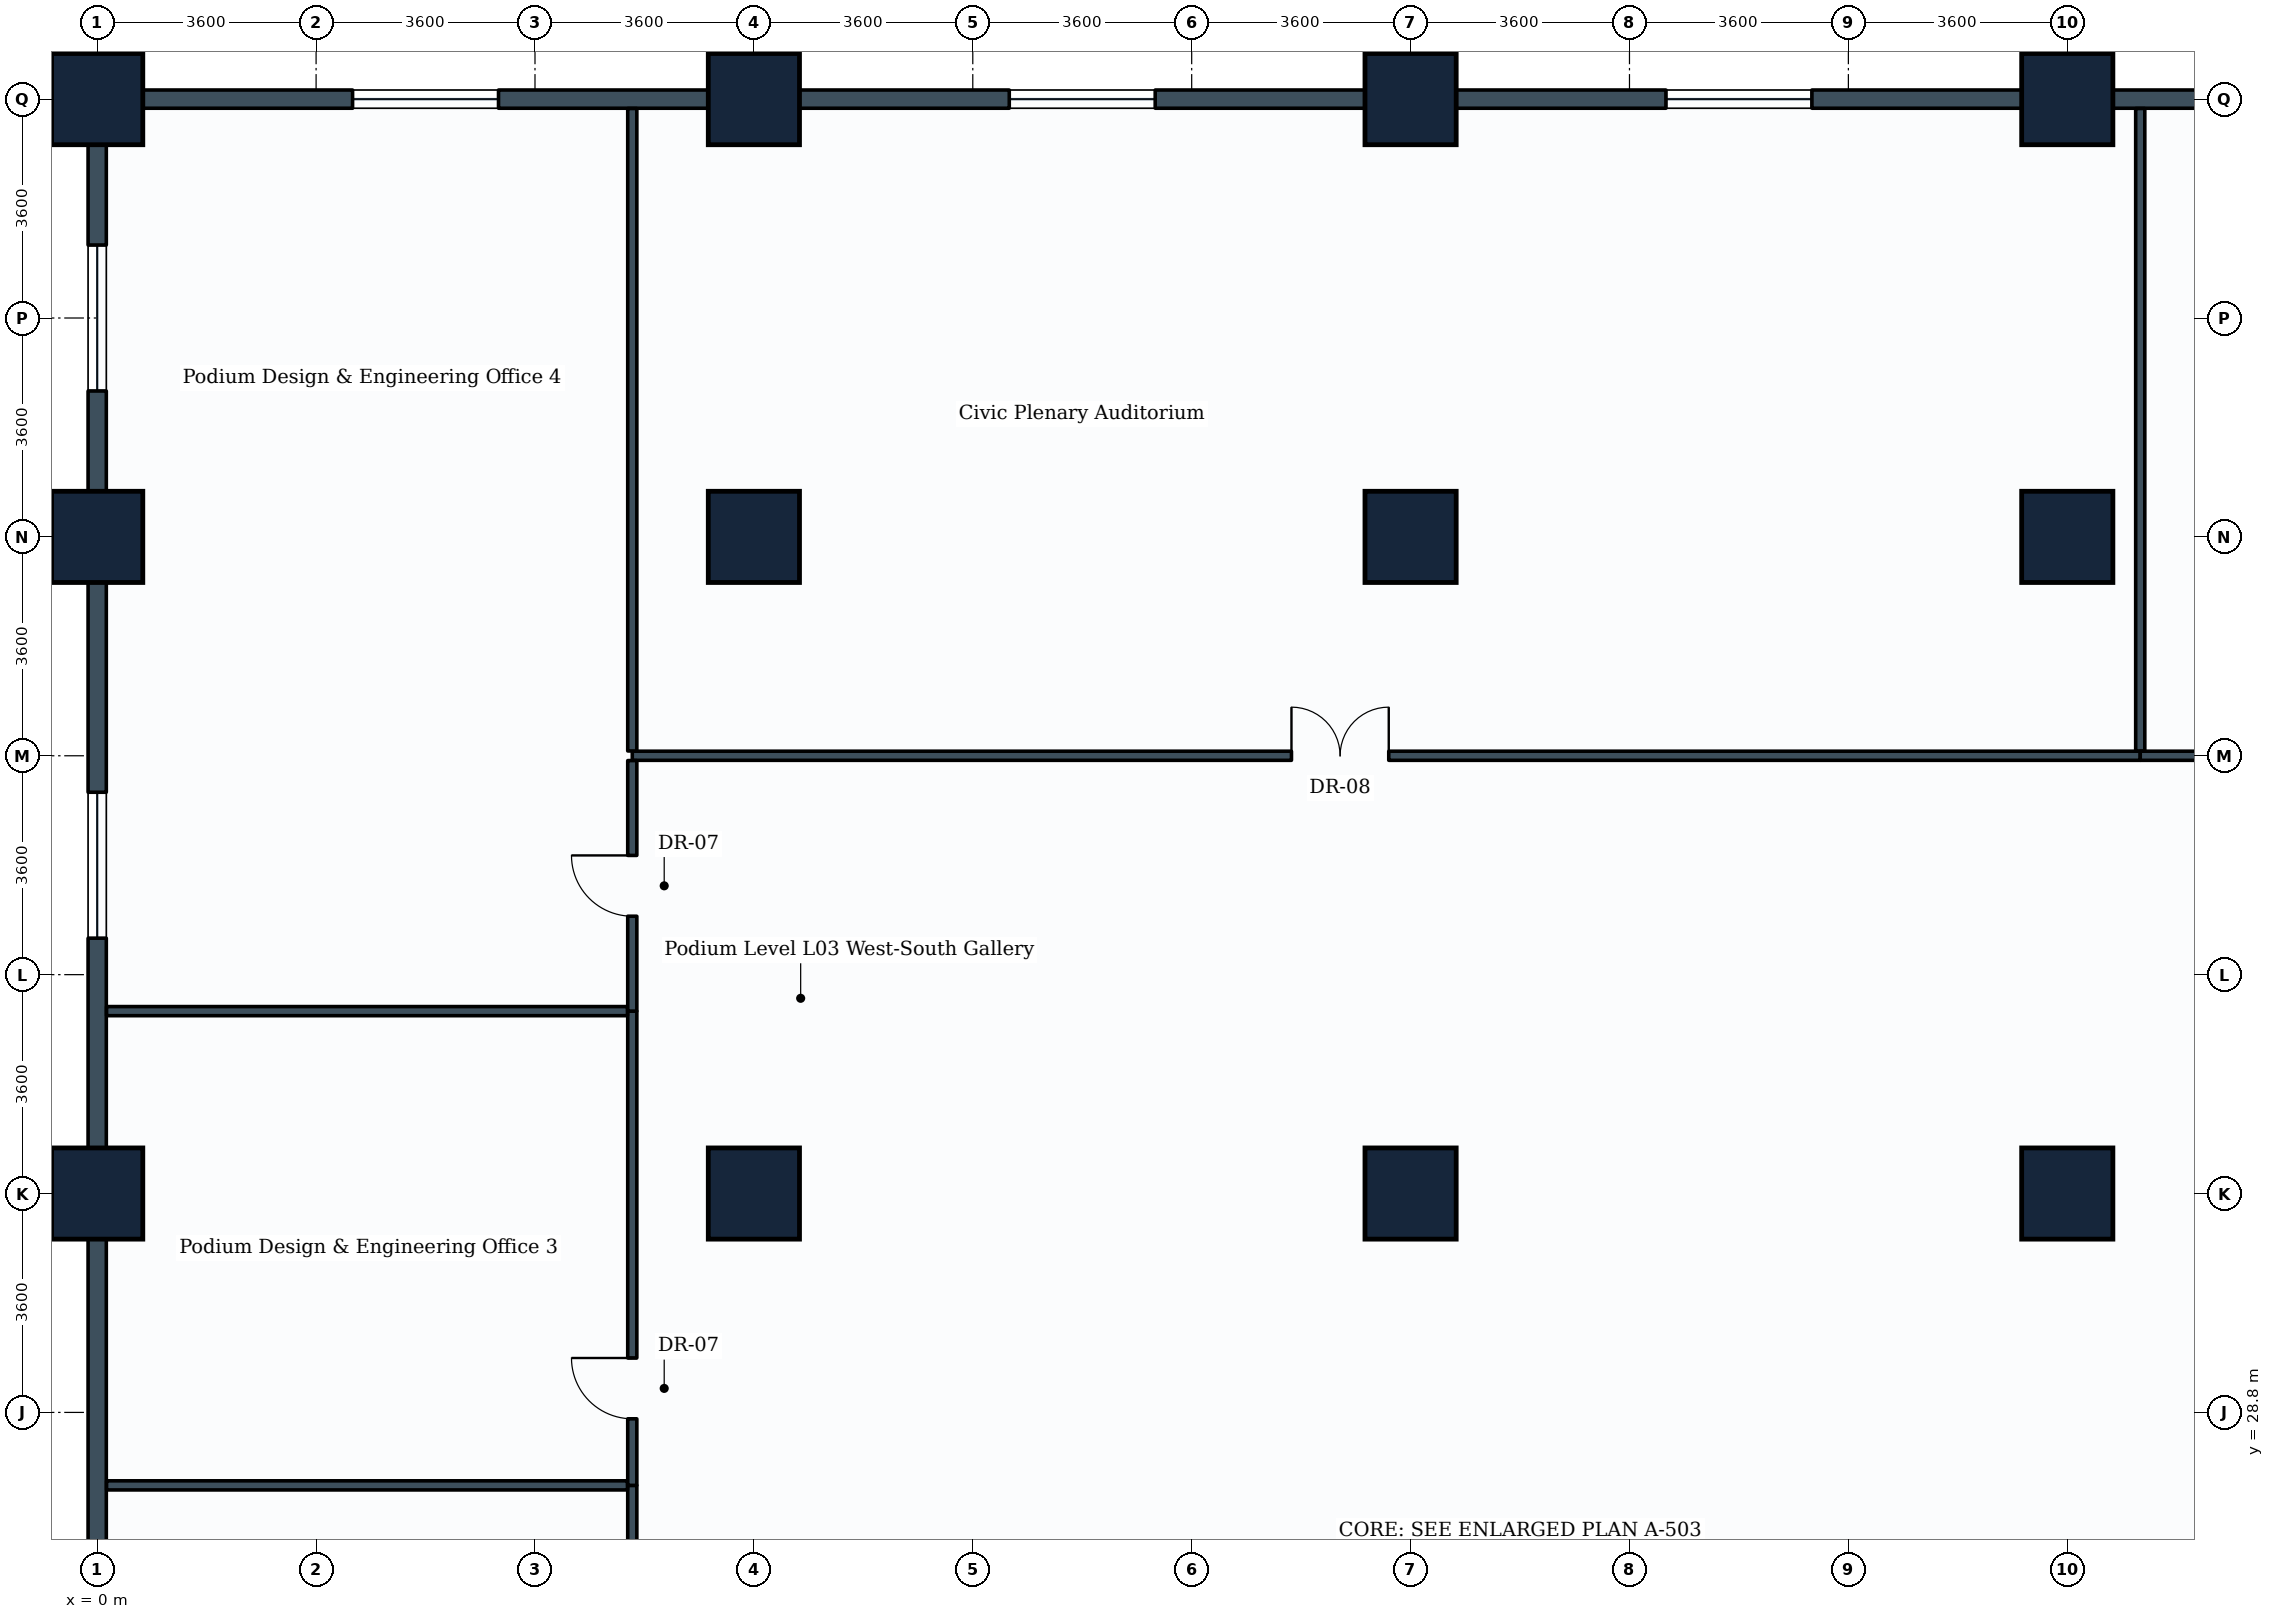
"""IFC4 building model, lengths in metres.
Left out: names, types, materials, properties, quantities, classifications, styles, units other than length and angle.
Written with IfcOpenShell. Run it as: python <this file> out.ifc"""

import sys

from ifc_helpers import new_model, si_unit, direction, frame, frame_2d, origin, origin_2d, place, context, subcontext, project, spatial, rectangle, extrude, element, fill, save


model = new_model("IFC4")
c1 = context("Model", 3, precision=1e-05, world=origin(), true_north=direction((0.0, 1.0)))
c2 = subcontext(c1, "Body", "Model", "MODEL_VIEW")
j1 = project(units=[si_unit("LENGTHUNIT", "METRE"), si_unit("PLANEANGLEUNIT", "RADIAN")], contexts=[c1])
p1 = place(None, origin())
s1 = spatial("IfcSite", under=j1, at=p1, CompositionType="ELEMENT")
p2 = place(p1, origin())
s2 = spatial("IfcBuilding", under=s1, at=p2, CompositionType="ELEMENT")
p3 = place(p2, frame((0.0, 0.0, 14.8)))
s3 = spatial("IfcBuildingStorey", under=s2, at=p3, CompositionType="ELEMENT", Elevation=14.8)
for number, where, z_axis, x_axis in (
    (1, (0.0, 32.4, 0.0), (0.0, 0.0, 1.0), (1.0, 0.0, 0.0)),
    (2, (0.0, 43.2, 0.0), (0.0, 0.0, 1.0), (1.0, 0.0, 0.0)),
    (3, (0.0, 50.4, 0.0), (0.0, 0.0, 1.0), (1.0, 0.0, 0.0)),
    (4, (10.8, 32.4, 0.0), (0.0, 0.0, 1.0), (1.0, 0.0, 0.0)),
    (5, (10.8, 43.2, 0.0), (0.0, 0.0, 1.0), (1.0, 0.0, 0.0)),
    (6, (10.8, 50.4, 0.0), (0.0, 0.0, 1.0), (1.0, 0.0, 0.0)),
    (7, (21.6, 32.4, 0.0), (0.0, 0.0, 1.0), (1.0, 0.0, 0.0)),
    (8, (21.6, 43.2, 0.0), (0.0, 0.0, 1.0), (1.0, 0.0, 0.0)),
    (9, (21.6, 50.4, 0.0), (0.0, 0.0, 1.0), (1.0, 0.0, 0.0)),
    (10, (32.4, 32.4, 0.0), (0.0, 0.0, 1.0), (1.0, 0.0, 0.0)),
    (11, (32.4, 43.2, 0.0), (0.0, 0.0, 1.0), (1.0, 0.0, 0.0)),
    (12, (32.4, 50.4, 0.0), (0.0, 0.0, 1.0), (1.0, 0.0, 0.0)),
):
    element("IfcColumn", number, at=place(p3, frame(where, z_axis=z_axis, x_axis=x_axis)), inside=s3, PredefinedType="COLUMN", context=c2, shape_type="SweptSolid", body=[
        extrude(rectangle(XDim=1.5, YDim=1.5, at=origin_2d()), origin(), (0.0, 0.0, 1.0), 4.6),
    ])
p4 = place(p3, frame((0.0, 50.4, 0.0), z_axis=(0.0, 0.0, 1.0), x_axis=(1.0, 0.0, 0.0)))
e13 = element("IfcWall", 13, at=p4, inside=s3, PredefinedType="STANDARD", context=c2, shape_type="SweptSolid", body=[
    extrude(rectangle(XDim=10.8, YDim=0.3, at=frame_2d((5.4, 0.0))), origin(), (0.0, 0.0, 1.0), 3.63),
])
p5 = place(p4, frame((4.2, 0.0, 0.85)))
e14 = element("IfcOpeningElement", 14, at=p5, cuts=e13, PredefinedType="OPENING", context=c2, shape_type="SweptSolid", body=[
    extrude(rectangle(XDim=2.4, YDim=1.6, at=frame_2d((1.2, 0.8))), frame((0.0, 0.16, 0.0), z_axis=(0.0, -1.0, 0.0), x_axis=(1.0, 0.0, 0.0)), (0.0, 0.0, 1.0), 0.32),
])
p6 = place(p3, frame((10.8, 50.4, 0.0), z_axis=(0.0, 0.0, 1.0), x_axis=(1.0, 0.0, 0.0)))
e15 = element("IfcWall", 15, at=p6, inside=s3, PredefinedType="STANDARD", context=c2, shape_type="SweptSolid", body=[
    extrude(rectangle(XDim=10.8, YDim=0.3, at=frame_2d((5.4, 0.0))), origin(), (0.0, 0.0, 1.0), 3.63),
])
p7 = place(p6, frame((4.2, 0.0, 0.85)))
e16 = element("IfcOpeningElement", 16, at=p7, cuts=e15, PredefinedType="OPENING", context=c2, shape_type="SweptSolid", body=[
    extrude(rectangle(XDim=2.4, YDim=1.6, at=frame_2d((1.2, 0.8))), frame((0.0, 0.16, 0.0), z_axis=(0.0, -1.0, 0.0), x_axis=(1.0, 0.0, 0.0)), (0.0, 0.0, 1.0), 0.32),
])
p8 = place(p3, frame((21.6, 50.4, 0.0), z_axis=(0.0, 0.0, 1.0), x_axis=(1.0, 0.0, 0.0)))
e17 = element("IfcWall", 17, at=p8, inside=s3, PredefinedType="STANDARD", context=c2, shape_type="SweptSolid", body=[
    extrude(rectangle(XDim=10.8, YDim=0.3, at=frame_2d((5.4, 0.0))), origin(), (0.0, 0.0, 1.0), 3.63),
])
p9 = place(p8, frame((4.2, 0.0, 0.85)))
e18 = element("IfcOpeningElement", 18, at=p9, cuts=e17, PredefinedType="OPENING", context=c2, shape_type="SweptSolid", body=[
    extrude(rectangle(XDim=2.4, YDim=1.6, at=frame_2d((1.2, 0.8))), frame((0.0, 0.16, 0.0), z_axis=(0.0, -1.0, 0.0), x_axis=(1.0, 0.0, 0.0)), (0.0, 0.0, 1.0), 0.32),
])
p10 = place(p3, frame((32.4, 50.4, 0.0), z_axis=(0.0, 0.0, 1.0), x_axis=(1.0, 0.0, 0.0)))
e19 = element("IfcWall", 19, at=p10, inside=s3, PredefinedType="STANDARD", context=c2, shape_type="SweptSolid", body=[
    extrude(rectangle(XDim=10.8, YDim=0.3, at=frame_2d((5.4, 0.0))), origin(), (0.0, 0.0, 1.0), 3.63),
])
p11 = place(p10, frame((4.2, 0.0, 0.85)))
e20 = element("IfcOpeningElement", 20, at=p11, cuts=e19, PredefinedType="OPENING", context=c2, shape_type="SweptSolid", body=[
    extrude(rectangle(XDim=2.4, YDim=1.6, at=frame_2d((1.2, 0.8))), frame((0.0, 0.16, 0.0), z_axis=(0.0, -1.0, 0.0), x_axis=(1.0, 0.0, 0.0)), (0.0, 0.0, 1.0), 0.32),
])
p12 = place(p3, frame((0.0, 21.6, 0.0), z_axis=(0.0, 0.0, 1.0), x_axis=(0.0, 1.0, 0.0)))
e21 = element("IfcWall", 21, at=p12, inside=s3, PredefinedType="STANDARD", context=c2, shape_type="SweptSolid", body=[
    extrude(rectangle(XDim=10.8, YDim=0.3, at=frame_2d((5.4, 0.0))), origin(), (0.0, 0.0, 1.0), 3.63),
])
p13 = place(p3, frame((0.0, 32.4, 0.0), z_axis=(0.0, 0.0, 1.0), x_axis=(0.0, 1.0, 0.0)))
e22 = element("IfcWall", 22, at=p13, inside=s3, PredefinedType="STANDARD", context=c2, shape_type="SweptSolid", body=[
    extrude(rectangle(XDim=10.8, YDim=0.3, at=frame_2d((5.4, 0.0))), origin(), (0.0, 0.0, 1.0), 3.63),
])
p14 = place(p13, frame((4.2, 0.0, 0.85)))
e23 = element("IfcOpeningElement", 23, at=p14, cuts=e22, PredefinedType="OPENING", context=c2, shape_type="SweptSolid", body=[
    extrude(rectangle(XDim=2.4, YDim=1.6, at=frame_2d((1.2, 0.8))), frame((0.0, 0.16, 0.0), z_axis=(0.0, -1.0, 0.0), x_axis=(1.0, 0.0, 0.0)), (0.0, 0.0, 1.0), 0.32),
])
p15 = place(p3, frame((0.0, 43.2, 0.0), z_axis=(0.0, 0.0, 1.0), x_axis=(0.0, 1.0, 0.0)))
e24 = element("IfcWall", 24, at=p15, inside=s3, PredefinedType="STANDARD", context=c2, shape_type="SweptSolid", body=[
    extrude(rectangle(XDim=7.2, YDim=0.3, at=frame_2d((3.6, 0.0))), origin(), (0.0, 0.0, 1.0), 3.63),
])
p16 = place(p15, frame((2.4, 0.0, 0.85)))
e25 = element("IfcOpeningElement", 25, at=p16, cuts=e24, PredefinedType="OPENING", context=c2, shape_type="SweptSolid", body=[
    extrude(rectangle(XDim=2.4, YDim=1.6, at=frame_2d((1.2, 0.8))), frame((0.0, 0.16, 0.0), z_axis=(0.0, -1.0, 0.0), x_axis=(1.0, 0.0, 0.0)), (0.0, 0.0, 1.0), 0.32),
])
p17 = place(p3, frame((8.8, 39.6, 0.0), z_axis=(0.0, 0.0, 1.0), x_axis=(1.0, 0.0, 0.0)))
e26 = element("IfcWall", 26, at=p17, inside=s3, PredefinedType="PARTITIONING", context=c2, shape_type="SweptSolid", body=[
    extrude(rectangle(XDim=24.8, YDim=0.15, at=frame_2d((12.4, 0.0))), origin(), (0.0, 0.0, 1.0), 3.63),
])
p18 = place(p17, frame((10.841, 0.0, 0.0)))
e27 = element("IfcOpeningElement", 27, at=p18, cuts=e26, PredefinedType="OPENING", context=c2, shape_type="SweptSolid", body=[
    extrude(rectangle(XDim=1.6, YDim=2.2, at=frame_2d((0.8, 1.1))), frame((0.0, 0.085, 0.0), z_axis=(0.0, -1.0, 0.0), x_axis=(1.0, 0.0, 0.0)), (0.0, 0.0, 1.0), 0.17),
])
p19 = place(p3, frame((33.6, 39.679, 0.0), z_axis=(0.0, 0.0, 1.0), x_axis=(0.0, 1.0, 0.0)))
e28 = element("IfcWall", 28, at=p19, inside=s3, PredefinedType="PARTITIONING", context=c2, shape_type="SweptSolid", body=[
    extrude(rectangle(XDim=10.567, YDim=0.15, at=frame_2d((5.284, 0.0))), origin(), (0.0, 0.0, 1.0), 3.63),
])
p20 = place(p3, frame((33.6, 39.6, 0.0), z_axis=(0.0, 0.0, 1.0), x_axis=(1.0, 0.0, 0.0)))
e29 = element("IfcWall", 29, at=p20, inside=s3, PredefinedType="PARTITIONING", context=c2, shape_type="SweptSolid", body=[
    extrude(rectangle(XDim=29.6, YDim=0.15, at=frame_2d((14.8, 0.0))), origin(), (0.0, 0.0, 1.0), 3.63),
])
p21 = place(p20, frame((13.96, 0.0, 0.0)))
e30 = element("IfcOpeningElement", 30, at=p21, cuts=e29, PredefinedType="OPENING", context=c2, shape_type="SweptSolid", body=[
    extrude(rectangle(XDim=1.6, YDim=2.2, at=frame_2d((0.8, 1.1))), frame((0.0, 0.085, 0.0), z_axis=(0.0, -1.0, 0.0), x_axis=(1.0, 0.0, 0.0)), (0.0, 0.0, 1.0), 0.17),
])
p22 = place(p3, frame((8.8, 17.4, 0.0), z_axis=(0.0, 0.0, 1.0), x_axis=(0.0, 1.0, 0.0)))
e31 = element("IfcWall", 31, at=p22, inside=s3, PredefinedType="PARTITIONING", context=c2, shape_type="SweptSolid", body=[
    extrude(rectangle(XDim=10.2, YDim=0.15, at=frame_2d((5.1, 0.0))), origin(), (0.0, 0.0, 1.0), 3.63),
])
p23 = place(p22, frame((6.909, 0.0, 0.0)))
e32 = element("IfcOpeningElement", 32, at=p23, cuts=e31, PredefinedType="OPENING", context=c2, shape_type="SweptSolid", body=[
    extrude(rectangle(XDim=1.0, YDim=2.1, at=frame_2d((0.5, 1.05))), frame((0.0, 0.085, 0.0), z_axis=(0.0, -1.0, 0.0), x_axis=(1.0, 0.0, 0.0)), (0.0, 0.0, 1.0), 0.17),
])
p24 = place(p3, frame((0.154, 27.6, 0.0), z_axis=(0.0, 0.0, 1.0), x_axis=(1.0, 0.0, 0.0)))
e33 = element("IfcWall", 33, at=p24, inside=s3, PredefinedType="PARTITIONING", context=c2, shape_type="SweptSolid", body=[
    extrude(rectangle(XDim=8.567, YDim=0.15, at=frame_2d((4.283, 0.0))), origin(), (0.0, 0.0, 1.0), 3.83),
])
p25 = place(p3, frame((8.8, 27.6, 0.0), z_axis=(0.0, 0.0, 1.0), x_axis=(0.0, 1.0, 0.0)))
e34 = element("IfcWall", 34, at=p25, inside=s3, PredefinedType="PARTITIONING", context=c2, shape_type="SweptSolid", body=[
    extrude(rectangle(XDim=7.8, YDim=0.15, at=frame_2d((3.9, 0.0))), origin(), (0.0, 0.0, 1.0), 3.63),
])
p26 = place(p25, frame((1.095, 0.0, 0.0)))
e35 = element("IfcOpeningElement", 35, at=p26, cuts=e34, PredefinedType="OPENING", context=c2, shape_type="SweptSolid", body=[
    extrude(rectangle(XDim=1.0, YDim=2.1, at=frame_2d((0.5, 1.05))), frame((0.0, 0.085, 0.0), z_axis=(0.0, -1.0, 0.0), x_axis=(1.0, 0.0, 0.0)), (0.0, 0.0, 1.0), 0.17),
])
p27 = place(p3, frame((0.154, 35.4, 0.0), z_axis=(0.0, 0.0, 1.0), x_axis=(1.0, 0.0, 0.0)))
e36 = element("IfcWall", 36, at=p27, inside=s3, PredefinedType="PARTITIONING", context=c2, shape_type="SweptSolid", body=[
    extrude(rectangle(XDim=8.567, YDim=0.15, at=frame_2d((4.283, 0.0))), origin(), (0.0, 0.0, 1.0), 3.83),
])
p28 = place(p3, frame((8.8, 35.4, 0.0), z_axis=(0.0, 0.0, 1.0), x_axis=(0.0, 1.0, 0.0)))
e37 = element("IfcWall", 37, at=p28, inside=s3, PredefinedType="PARTITIONING", context=c2, shape_type="SweptSolid", body=[
    extrude(rectangle(XDim=4.121, YDim=0.15, at=frame_2d((2.061, 0.0))), origin(), (0.0, 0.0, 1.0), 4.285),
])
p29 = place(p28, frame((1.561, 0.0, 0.0)))
e38 = element("IfcOpeningElement", 38, at=p29, cuts=e37, PredefinedType="OPENING", context=c2, shape_type="SweptSolid", body=[
    extrude(rectangle(XDim=1.0, YDim=2.1, at=frame_2d((0.5, 1.05))), frame((0.0, 0.085, 0.0), z_axis=(0.0, -1.0, 0.0), x_axis=(1.0, 0.0, 0.0)), (0.0, 0.0, 1.0), 0.17),
])
p30 = place(p3, frame((8.8, 39.679, 0.0), z_axis=(0.0, 0.0, 1.0), x_axis=(0.0, 1.0, 0.0)))
e39 = element("IfcWall", 39, at=p30, inside=s3, PredefinedType="PARTITIONING", context=c2, shape_type="SweptSolid", body=[
    extrude(rectangle(XDim=10.567, YDim=0.15, at=frame_2d((5.284, 0.0))), origin(), (0.0, 0.0, 1.0), 3.63),
])
p31 = place(p5, origin())
e40 = element("IfcWindow", 40, at=p31, inside=s3, PartitioningType="SINGLE_PANEL", PredefinedType="WINDOW", context=c2, shape_type="SweptSolid", body=[
    extrude(rectangle(XDim=2.4, YDim=1.6, at=frame_2d((1.2, 0.8))), frame((0.0, 0.03, 0.0), z_axis=(0.0, -1.0, 0.0), x_axis=(1.0, 0.0, 0.0)), (0.0, 0.0, 1.0), 0.06),
])
fill(e14, e40)
p32 = place(p7, origin())
e41 = element("IfcWindow", 41, at=p32, inside=s3, PartitioningType="SINGLE_PANEL", PredefinedType="WINDOW", context=c2, shape_type="SweptSolid", body=[
    extrude(rectangle(XDim=2.4, YDim=1.6, at=frame_2d((1.2, 0.8))), frame((0.0, 0.03, 0.0), z_axis=(0.0, -1.0, 0.0), x_axis=(1.0, 0.0, 0.0)), (0.0, 0.0, 1.0), 0.06),
])
fill(e16, e41)
p33 = place(p9, origin())
e42 = element("IfcWindow", 42, at=p33, inside=s3, PartitioningType="SINGLE_PANEL", PredefinedType="WINDOW", context=c2, shape_type="SweptSolid", body=[
    extrude(rectangle(XDim=2.4, YDim=1.6, at=frame_2d((1.2, 0.8))), frame((0.0, 0.03, 0.0), z_axis=(0.0, -1.0, 0.0), x_axis=(1.0, 0.0, 0.0)), (0.0, 0.0, 1.0), 0.06),
])
fill(e18, e42)
p34 = place(p14, origin())
e43 = element("IfcWindow", 43, at=p34, inside=s3, PartitioningType="SINGLE_PANEL", PredefinedType="WINDOW", context=c2, shape_type="SweptSolid", body=[
    extrude(rectangle(XDim=2.4, YDim=1.6, at=frame_2d((1.2, 0.8))), frame((0.0, 0.03, 0.0), z_axis=(0.0, -1.0, 0.0), x_axis=(1.0, 0.0, 0.0)), (0.0, 0.0, 1.0), 0.06),
])
fill(e23, e43)
p35 = place(p16, origin())
e44 = element("IfcWindow", 44, at=p35, inside=s3, PartitioningType="SINGLE_PANEL", PredefinedType="WINDOW", context=c2, shape_type="SweptSolid", body=[
    extrude(rectangle(XDim=2.4, YDim=1.6, at=frame_2d((1.2, 0.8))), frame((0.0, 0.03, 0.0), z_axis=(0.0, -1.0, 0.0), x_axis=(1.0, 0.0, 0.0)), (0.0, 0.0, 1.0), 0.06),
])
fill(e25, e44)
p36 = place(p18, origin())
e45 = element("IfcDoor", 45, at=p36, inside=s3, OperationType="DOUBLE_DOOR_SINGLE_SWING", PredefinedType="DOOR", context=c2, shape_type="SweptSolid", body=[
    extrude(rectangle(XDim=1.6, YDim=2.2, at=frame_2d((0.8, 1.1))), frame((0.0, 0.025, 0.0), z_axis=(0.0, -1.0, 0.0), x_axis=(1.0, 0.0, 0.0)), (0.0, 0.0, 1.0), 0.05),
])
fill(e27, e45)
p37 = place(p26, origin())
e46 = element("IfcDoor", 46, at=p37, inside=s3, OperationType="SINGLE_SWING_RIGHT", PredefinedType="DOOR", context=c2, shape_type="SweptSolid", body=[
    extrude(rectangle(XDim=1.0, YDim=2.1, at=frame_2d((0.5, 1.05))), frame((0.0, 0.025, 0.0), z_axis=(0.0, -1.0, 0.0), x_axis=(1.0, 0.0, 0.0)), (0.0, 0.0, 1.0), 0.05),
])
fill(e35, e46)
p38 = place(p29, origin())
e47 = element("IfcDoor", 47, at=p38, inside=s3, OperationType="SINGLE_SWING_RIGHT", PredefinedType="DOOR", context=c2, shape_type="SweptSolid", body=[
    extrude(rectangle(XDim=1.0, YDim=2.1, at=frame_2d((0.5, 1.05))), frame((0.0, 0.025, 0.0), z_axis=(0.0, -1.0, 0.0), x_axis=(1.0, 0.0, 0.0)), (0.0, 0.0, 1.0), 0.05),
])
fill(e38, e47)
save(model, sys.argv[1])
